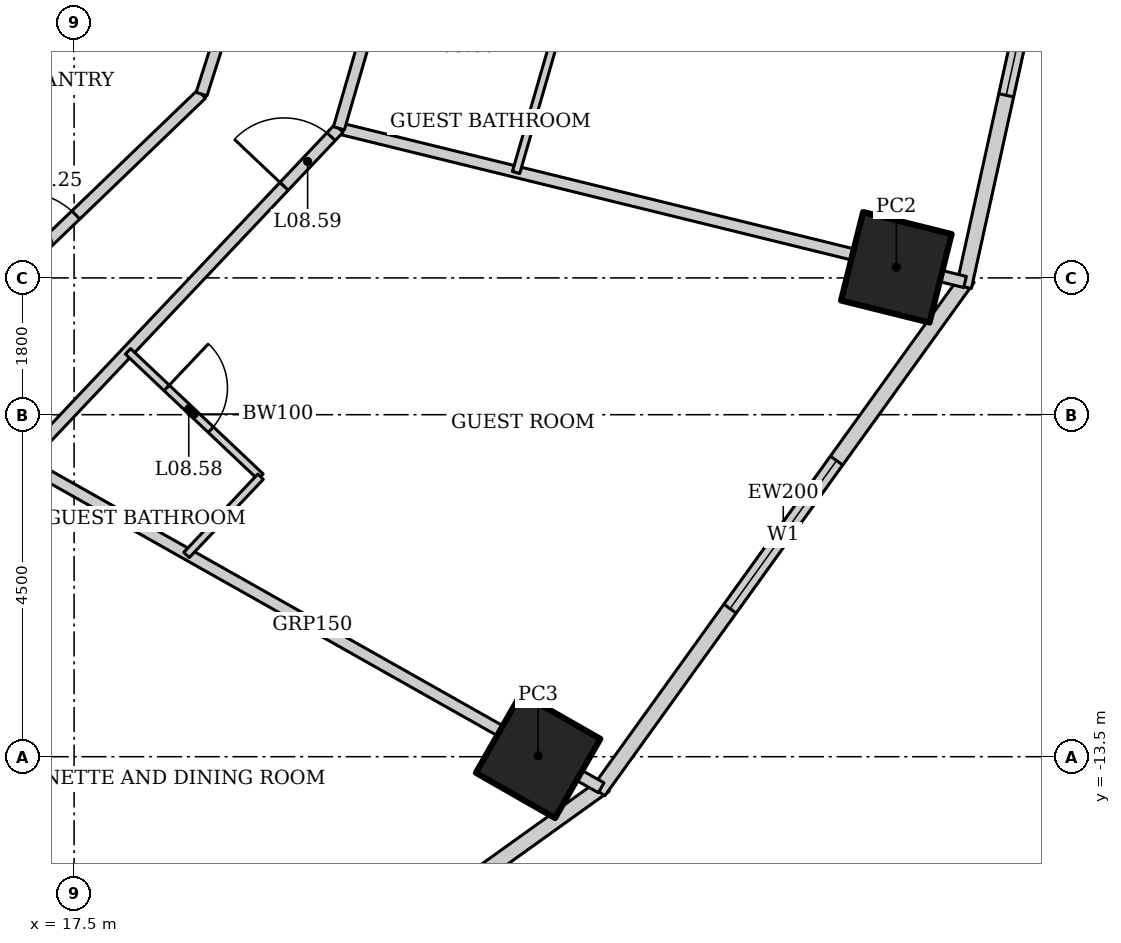
"""IFC4 building model, lengths in metres.
Left out: names, types, materials, properties, quantities, classifications, styles, units other than length and angle.
Written with IfcOpenShell. Run it as: python <this file> out.ifc"""

import sys

from ifc_helpers import new_model, si_unit, direction, frame, frame_2d, origin, origin_2d, place, context, subcontext, project, spatial, rectangle, hollow_rectangle, extrude, element, fill, save


model = new_model("IFC4")
c1 = context("Model", 3, precision=1e-05, world=origin(), true_north=direction((0.0, 1.0)))
c2 = subcontext(c1, "Body", "Model", "MODEL_VIEW")
j1 = project(units=[si_unit("LENGTHUNIT", "METRE"), si_unit("PLANEANGLEUNIT", "RADIAN")], contexts=[c1])
p1 = place(None, origin())
s1 = spatial("IfcSite", under=j1, at=p1, CompositionType="ELEMENT")
p2 = place(p1, origin())
s2 = spatial("IfcBuilding", under=s1, at=p2, CompositionType="ELEMENT")
p3 = place(p2, frame((0.0, 0.0, 44.2)))
s3 = spatial("IfcBuildingStorey", under=s2, at=p3, CompositionType="ELEMENT", Elevation=44.2)
p4 = place(p3, frame((23.605, -13.489, 0.0), z_axis=(0.0, 0.0, 1.0), x_axis=(0.496139221777, 0.86824298017, 0.0)))
e1 = element("IfcColumn", 1, at=p4, inside=s3, PredefinedType="COLUMN", context=c2, shape_type="SweptSolid", body=[
    extrude(hollow_rectangle(XDim=1.2, YDim=1.2, WallThickness=0.12, at=origin_2d()), origin(), (0.0, 0.0, 1.0), 3.6),
])
p5 = place(p3, frame((28.318, -7.06, 0.0), z_axis=(0.0, 0.0, 1.0), x_axis=(0.2419218956, 0.970295726276, 0.0)))
e2 = element("IfcColumn", 2, at=p5, inside=s3, PredefinedType="COLUMN", context=c2, shape_type="SweptSolid", body=[
    extrude(hollow_rectangle(XDim=1.2, YDim=1.2, WallThickness=0.1, at=origin_2d()), origin(), (0.0, 0.0, 1.0), 3.6),
])
p6 = place(p3, frame((17.929, -18.572, 0.0), z_axis=(0.0, 0.0, 1.0), x_axis=(0.812791321576, 0.582554948112, 0.0)))
e3 = element("IfcWall", 3, at=p6, inside=s3, PredefinedType="SOLIDWALL", context=c2, shape_type="SweptSolid", body=[
    extrude(rectangle(XDim=8.063, YDim=0.2, at=frame_2d((4.032, 0.0))), origin(), (0.0, 0.0, 1.0), 3.45),
])
p7 = place(p6, frame((2.832, 0.0, 0.5)))
e4 = element("IfcOpeningElement", 4, at=p7, cuts=e3, PredefinedType="OPENING", context=c2, shape_type="SweptSolid", body=[
    extrude(rectangle(XDim=2.4, YDim=2.2, at=frame_2d((1.2, 1.1))), frame((0.0, 0.11, 0.0), z_axis=(0.0, -1.0, 0.0), x_axis=(1.0, 0.0, 0.0)), (0.0, 0.0, 1.0), 0.22),
])
p8 = place(p3, frame((24.4, -13.957, 0.0), z_axis=(0.0, 0.0, 1.0), x_axis=(0.583937613703, 0.811798536155, 0.0)))
e5 = element("IfcWall", 5, at=p8, inside=s3, PredefinedType="SOLIDWALL", context=c2, shape_type="SweptSolid", body=[
    extrude(rectangle(XDim=8.323, YDim=0.2, at=frame_2d((4.162, 0.0))), origin(), (0.0, 0.0, 1.0), 3.45),
])
p9 = place(p8, frame((2.961, 0.0, 0.5)))
e6 = element("IfcOpeningElement", 6, at=p9, cuts=e5, PredefinedType="OPENING", context=c2, shape_type="SweptSolid", body=[
    extrude(rectangle(XDim=2.4, YDim=2.2, at=frame_2d((1.2, 1.1))), frame((0.0, 0.11, 0.0), z_axis=(0.0, -1.0, 0.0), x_axis=(1.0, 0.0, 0.0)), (0.0, 0.0, 1.0), 0.22),
])
p10 = place(p3, frame((29.208, -7.318, 0.0), z_axis=(0.0, 0.0, 1.0), x_axis=(0.215238065514, 0.976561608478, 0.0)))
e7 = element("IfcWall", 7, at=p10, inside=s3, PredefinedType="SOLIDWALL", context=c2, shape_type="SweptSolid", body=[
    extrude(rectangle(XDim=7.562, YDim=0.2, at=frame_2d((3.781, 0.0))), origin(), (0.0, 0.0, 1.0), 3.45),
])
p11 = place(p10, frame((2.581, 0.0, 0.5)))
e8 = element("IfcOpeningElement", 8, at=p11, cuts=e7, PredefinedType="OPENING", context=c2, shape_type="SweptSolid", body=[
    extrude(rectangle(XDim=2.4, YDim=2.2, at=frame_2d((1.2, 1.1))), frame((0.0, 0.11, 0.0), z_axis=(0.0, -1.0, 0.0), x_axis=(1.0, 0.0, 0.0)), (0.0, 0.0, 1.0), 0.22),
])
p12 = place(p3, frame((24.435, -13.909, 0.0), z_axis=(0.0, 0.0, 1.0), x_axis=(-0.87090601027, 0.491449612143, 0.0)))
e9 = element("IfcWall", 9, at=p12, inside=s3, PredefinedType="PARTITIONING", context=c2, shape_type="SweptSolid", body=[
    extrude(rectangle(XDim=8.726, YDim=0.15, at=frame_2d((4.363, 0.0))), origin(), (0.0, 0.0, 1.0), 2.693),
])
p13 = place(p3, frame((29.222, -7.254, 0.0), z_axis=(0.0, 0.0, 1.0), x_axis=(-0.971178166182, 0.238354713676, 0.0)))
e10 = element("IfcWall", 10, at=p13, inside=s3, PredefinedType="PARTITIONING", context=c2, shape_type="SweptSolid", body=[
    extrude(rectangle(XDim=8.482, YDim=0.15, at=frame_2d((4.241, 0.0))), origin(), (0.0, 0.0, 1.0), 2.333),
])
p14 = place(p3, frame((16.835, -9.62, 0.0), z_axis=(0.0, 0.0, 1.0), x_axis=(0.687062608696, 0.726598218916, 0.0)))
e11 = element("IfcWall", 11, at=p14, inside=s3, PredefinedType="PARTITIONING", context=c2, shape_type="SweptSolid", body=[
    extrude(rectangle(XDim=6.039, YDim=0.15, at=frame_2d((3.02, 0.0))), origin(), (0.0, 0.0, 1.0), 3.45),
])
p15 = place(p14, frame((4.989, 0.0, 0.0)))
e12 = element("IfcOpeningElement", 12, at=p15, cuts=e11, PredefinedType="OPENING", context=c2, shape_type="SweptSolid", body=[
    extrude(rectangle(XDim=0.9, YDim=2.1, at=frame_2d((0.45, 1.05))), frame((0.0, 0.085, 0.0), z_axis=(0.0, -1.0, 0.0), x_axis=(1.0, 0.0, 0.0)), (0.0, 0.0, 1.0), 0.17),
])
p16 = place(p3, frame((20.984, -5.232, 0.0), z_axis=(0.0, 0.0, 1.0), x_axis=(0.278247435376, 0.960509429785, 0.0)))
e13 = element("IfcWall", 13, at=p16, inside=s3, PredefinedType="PARTITIONING", context=c2, shape_type="SweptSolid", body=[
    extrude(rectangle(XDim=5.447, YDim=0.15, at=frame_2d((2.724, 0.0))), origin(), (0.0, 0.0, 1.0), 3.45),
])
p17 = place(p16, frame((4.397, 0.0, 0.0)))
e14 = element("IfcOpeningElement", 14, at=p17, cuts=e13, PredefinedType="OPENING", context=c2, shape_type="SweptSolid", body=[
    extrude(rectangle(XDim=0.9, YDim=2.1, at=frame_2d((0.45, 1.05))), frame((0.0, 0.085, 0.0), z_axis=(0.0, -1.0, 0.0), x_axis=(1.0, 0.0, 0.0)), (0.0, 0.0, 1.0), 0.17),
])
p18 = place(p3, frame((15.147, -8.656, 0.0), z_axis=(0.0, 0.0, 1.0), x_axis=(0.720837261072, 0.693104352209, 0.0)))
e15 = element("IfcWall", 15, at=p18, inside=s3, PredefinedType="PARTITIONING", context=c2, shape_type="SweptSolid", body=[
    extrude(rectangle(XDim=5.59, YDim=0.15, at=frame_2d((2.795, 0.0))), origin(), (0.0, 0.0, 1.0), 3.45),
])
p19 = place(p18, frame((2.295, 0.0, 0.0)))
e16 = element("IfcOpeningElement", 16, at=p19, cuts=e15, PredefinedType="OPENING", context=c2, shape_type="SweptSolid", body=[
    extrude(rectangle(XDim=1.0, YDim=2.1, at=frame_2d((0.5, 1.05))), frame((0.0, 0.085, 0.0), z_axis=(0.0, -1.0, 0.0), x_axis=(1.0, 0.0, 0.0)), (0.0, 0.0, 1.0), 0.17),
])
p20 = place(p3, frame((19.177, -4.781, 0.0), z_axis=(0.0, 0.0, 1.0), x_axis=(0.303505448228, 0.952829702988, 0.0)))
e17 = element("IfcWall", 17, at=p20, inside=s3, PredefinedType="PARTITIONING", context=c2, shape_type="SweptSolid", body=[
    extrude(rectangle(XDim=4.073, YDim=0.15, at=frame_2d((2.037, 0.0))), origin(), (0.0, 0.0, 1.0), 3.45),
])
p21 = place(p3, frame((18.209, -8.167, 0.0), z_axis=(0.0, 0.0, 1.0), x_axis=(0.726567238928, -0.687095369885, 0.0)))
e18 = element("IfcWall", 18, at=p21, inside=s3, PredefinedType="PARTITIONING", context=c2, shape_type="SweptSolid", body=[
    extrude(rectangle(XDim=2.4, YDim=0.1, at=frame_2d((1.2, 0.0))), origin(), (0.0, 0.0, 1.0), 3.45),
])
p22 = place(p21, frame((0.7, 0.0, 0.0)))
e19 = element("IfcOpeningElement", 19, at=p22, cuts=e18, PredefinedType="OPENING", context=c2, shape_type="SweptSolid", body=[
    extrude(rectangle(XDim=0.8, YDim=2.1, at=frame_2d((0.4, 1.05))), frame((0.0, 0.06, 0.0), z_axis=(0.0, -1.0, 0.0), x_axis=(1.0, 0.0, 0.0)), (0.0, 0.0, 1.0), 0.12),
])
p23 = place(p3, frame((19.953, -9.816, 0.0), z_axis=(0.0, 0.0, 1.0), x_axis=(-0.687017997787, -0.726640399866, 0.0)))
e20 = element("IfcWall", 20, at=p23, inside=s3, PredefinedType="PARTITIONING", context=c2, shape_type="SweptSolid", body=[
    extrude(rectangle(XDim=1.417, YDim=0.1, at=frame_2d((0.708, 0.0))), origin(), (0.0, 0.0, 1.0), 3.45),
])
p24 = place(p3, frame((23.846, -3.979, 0.0), z_axis=(0.0, 0.0, 1.0), x_axis=(-0.278197767203, -0.960523816635, 0.0)))
e21 = element("IfcWall", 21, at=p24, inside=s3, PredefinedType="PARTITIONING", context=c2, shape_type="SweptSolid", body=[
    extrude(rectangle(XDim=1.91, YDim=0.1, at=frame_2d((0.955, 0.0))), origin(), (0.0, 0.0, 1.0), 3.45),
])
p25 = place(p9, origin())
e22 = element("IfcWindow", 22, at=p25, inside=s3, PartitioningType="SINGLE_PANEL", PredefinedType="WINDOW", context=c2, shape_type="SweptSolid", body=[
    extrude(rectangle(XDim=2.4, YDim=2.2, at=frame_2d((1.2, 1.1))), frame((0.0, 0.03, 0.0), z_axis=(0.0, -1.0, 0.0), x_axis=(1.0, 0.0, 0.0)), (0.0, 0.0, 1.0), 0.06),
])
fill(e6, e22)
p26 = place(p11, origin())
e23 = element("IfcWindow", 23, at=p26, inside=s3, PartitioningType="SINGLE_PANEL", PredefinedType="WINDOW", context=c2, shape_type="SweptSolid", body=[
    extrude(rectangle(XDim=2.4, YDim=2.2, at=frame_2d((1.2, 1.1))), frame((0.0, 0.03, 0.0), z_axis=(0.0, -1.0, 0.0), x_axis=(1.0, 0.0, 0.0)), (0.0, 0.0, 1.0), 0.06),
])
fill(e8, e23)
p27 = place(p19, origin())
e24 = element("IfcDoor", 24, at=p27, inside=s3, OperationType="SINGLE_SWING_LEFT", PredefinedType="DOOR", context=c2, shape_type="SweptSolid", body=[
    extrude(rectangle(XDim=1.0, YDim=2.1, at=frame_2d((0.5, 1.05))), frame((0.0, 0.025, 0.0), z_axis=(0.0, -1.0, 0.0), x_axis=(1.0, 0.0, 0.0)), (0.0, 0.0, 1.0), 0.05),
])
fill(e16, e24)
p28 = place(p22, origin())
e25 = element("IfcDoor", 25, at=p28, inside=s3, OperationType="SINGLE_SWING_LEFT", PredefinedType="DOOR", context=c2, shape_type="SweptSolid", body=[
    extrude(rectangle(XDim=0.8, YDim=2.1, at=frame_2d((0.4, 1.05))), frame((0.0, 0.025, 0.0), z_axis=(0.0, -1.0, 0.0), x_axis=(1.0, 0.0, 0.0)), (0.0, 0.0, 1.0), 0.05),
])
fill(e19, e25)
p29 = place(p15, origin())
e26 = element("IfcDoor", 26, at=p29, inside=s3, OperationType="SINGLE_SWING_LEFT", PredefinedType="DOOR", context=c2, shape_type="SweptSolid", body=[
    extrude(rectangle(XDim=0.9, YDim=2.1, at=frame_2d((0.45, 1.05))), frame((0.0, 0.025, 0.0), z_axis=(0.0, -1.0, 0.0), x_axis=(1.0, 0.0, 0.0)), (0.0, 0.0, 1.0), 0.05),
])
fill(e12, e26)
save(model, sys.argv[1])
